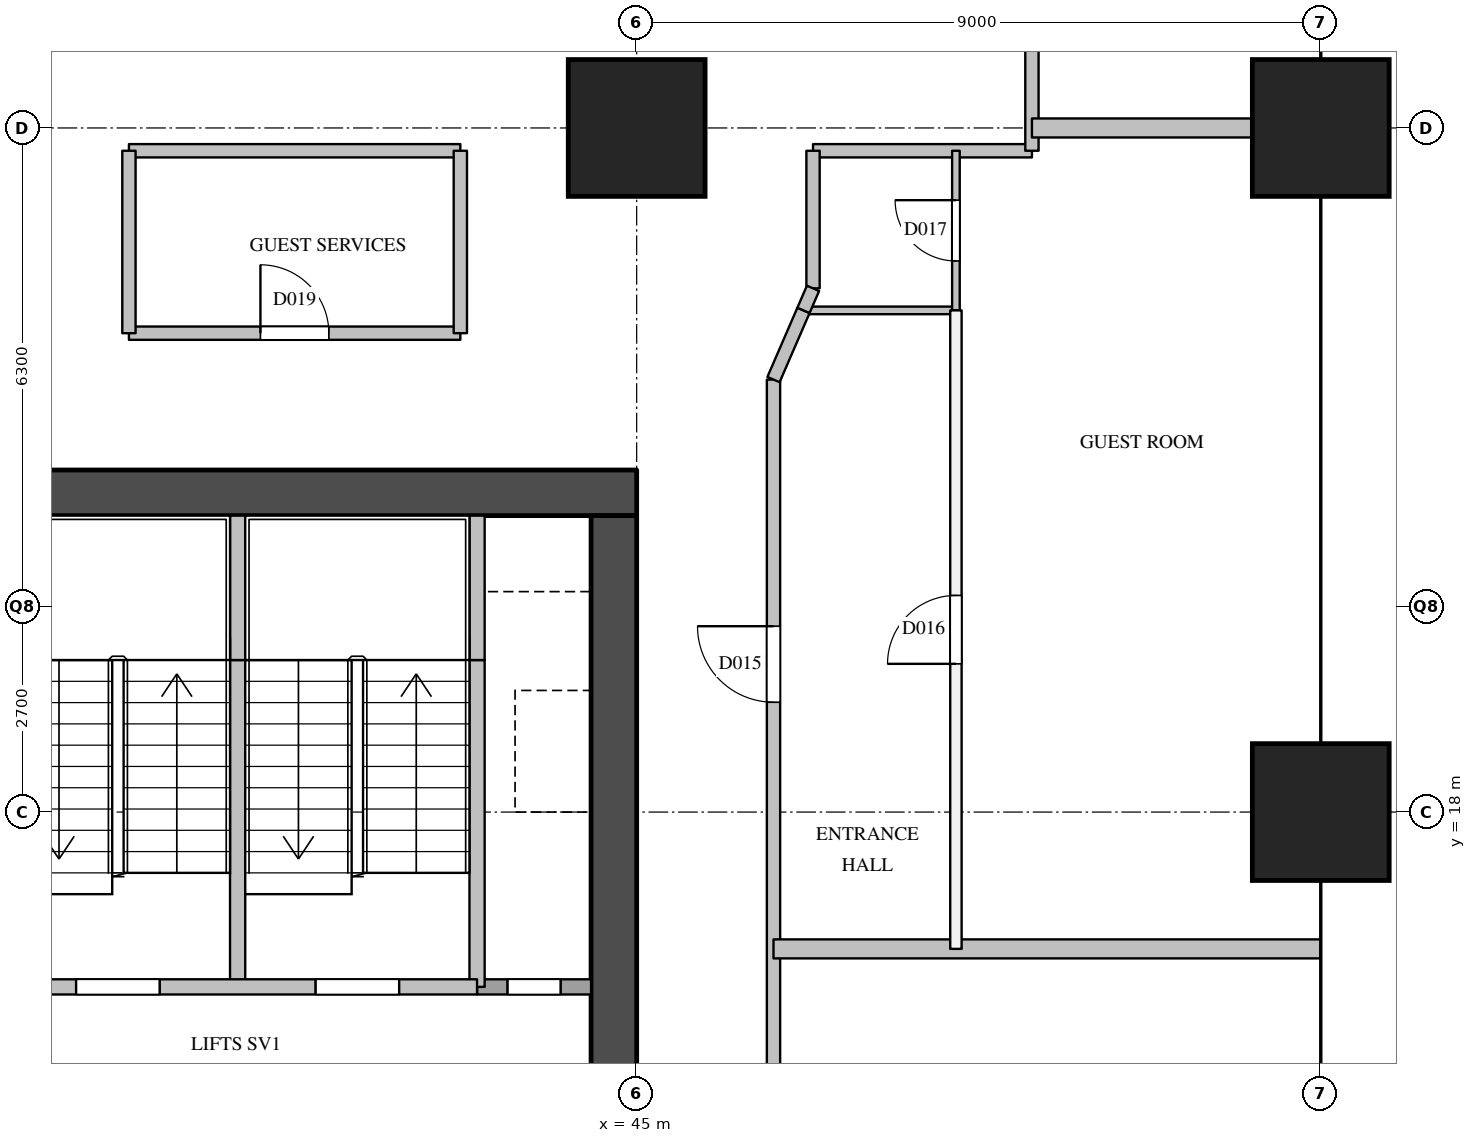
"""IFC4 building model, lengths in metres.
Left out: names, types, materials, properties, quantities, classifications, styles, units other than length and angle.
Written with IfcOpenShell. Run it as: python <this file> out.ifc"""

import sys

from ifc_helpers import new_model, si_unit, direction, frame, frame_2d, origin, origin_2d, place, context, subcontext, project, spatial, rectangle, extrude, element, fill, save


model = new_model("IFC4")
c1 = context("Model", 3, precision=1e-05, world=origin(), true_north=direction((0.0, 1.0)))
c2 = subcontext(c1, "Body", "Model", "MODEL_VIEW")
j1 = project(units=[si_unit("LENGTHUNIT", "METRE"), si_unit("PLANEANGLEUNIT", "RADIAN")], contexts=[c1])
p1 = place(None, origin())
s1 = spatial("IfcSite", under=j1, at=p1, CompositionType="ELEMENT")
p2 = place(p1, origin())
s2 = spatial("IfcBuilding", under=s1, at=p2, CompositionType="ELEMENT")
p3 = place(p2, frame((0.0, 0.0, 31.0)))
s3 = spatial("IfcBuildingStorey", under=s2, at=p3, CompositionType="ELEMENT", Elevation=31.0)
for number, where, z_axis, x_axis in (
    (1, (45.0, 27.0, 0.0), (0.0, 0.0, 1.0), (1.0, 0.0, 0.0)),
    (2, (54.0, 18.0, 0.0), (0.0, 0.0, 1.0), (1.0, 0.0, 0.0)),
    (3, (54.0, 27.0, 0.0), (0.0, 0.0, 1.0), (1.0, 0.0, 0.0)),
):
    element("IfcColumn", number, at=place(p3, frame(where, z_axis=z_axis, x_axis=x_axis)), inside=s3, PredefinedType="COLUMN", context=c2, shape_type="SweptSolid", body=[
        extrude(rectangle(XDim=1.8, YDim=1.8, at=origin_2d()), origin(), (0.0, 0.0, 1.0), 3.8),
    ])
p4 = place(p3, frame((36.0, 22.2, 0.0), z_axis=(0.0, 0.0, 1.0), x_axis=(1.0, 0.0, 0.0)))
e4 = element("IfcWall", 4, at=p4, inside=s3, PredefinedType="SHEAR", context=c2, shape_type="SweptSolid", body=[
    extrude(rectangle(XDim=9.0, YDim=0.6, at=frame_2d((4.5, 0.0))), origin(), (0.0, 0.0, 1.0), 3.5),
])
p5 = place(p3, frame((44.7, 9.6, 0.0), z_axis=(0.0, 0.0, 1.0), x_axis=(0.0, 1.0, 0.0)))
e5 = element("IfcWall", 5, at=p5, inside=s3, PredefinedType="SHEAR", context=c2, shape_type="SweptSolid", body=[
    extrude(rectangle(XDim=12.3, YDim=0.6, at=frame_2d((6.15, 0.0))), origin(), (0.0, 0.0, 1.0), 3.5),
])
p6 = place(p5, frame((0.8, 0.0, 0.0)))
e6 = element("IfcOpeningElement", 6, at=p6, cuts=e5, PredefinedType="OPENING", context=c2, shape_type="SweptSolid", body=[
    extrude(rectangle(XDim=0.7, YDim=2.1, at=frame_2d((0.35, 1.05))), frame((0.0, 0.31, 0.0), z_axis=(0.0, -1.0, 0.0), x_axis=(1.0, 0.0, 0.0)), (0.0, 0.0, 1.0), 0.62),
])
p7 = place(p3, frame((39.75, 15.7, 0.0), z_axis=(0.0, 0.0, 1.0), x_axis=(0.0, 1.0, 0.0)))
e7 = element("IfcWall", 7, at=p7, inside=s3, PredefinedType="SOLIDWALL", context=c2, shape_type="SweptSolid", body=[
    extrude(rectangle(XDim=4.3, YDim=0.2, at=frame_2d((2.15, 0.0))), origin(), (0.0, 0.0, 1.0), 3.5),
])
p8 = place(p3, frame((39.75, 20.0, 0.0), z_axis=(0.0, 0.0, 1.0), x_axis=(0.0, 1.0, 0.0)))
e8 = element("IfcWall", 8, at=p8, inside=s3, PredefinedType="SOLIDWALL", context=c2, shape_type="SweptSolid", body=[
    extrude(rectangle(XDim=1.9, YDim=0.2, at=frame_2d((0.95, 0.0))), origin(), (0.0, 0.0, 1.0), 3.5),
])
p9 = place(p3, frame((42.9, 15.7, 0.0), z_axis=(0.0, 0.0, 1.0), x_axis=(0.0, 1.0, 0.0)))
e9 = element("IfcWall", 9, at=p9, inside=s3, PredefinedType="SOLIDWALL", context=c2, shape_type="SweptSolid", body=[
    extrude(rectangle(XDim=4.3, YDim=0.2, at=frame_2d((2.15, 0.0))), origin(), (0.0, 0.0, 1.0), 3.5),
])
p10 = place(p3, frame((42.9, 20.0, 0.0), z_axis=(0.0, 0.0, 1.0), x_axis=(0.0, 1.0, 0.0)))
e10 = element("IfcWall", 10, at=p10, inside=s3, PredefinedType="SOLIDWALL", context=c2, shape_type="SweptSolid", body=[
    extrude(rectangle(XDim=1.9, YDim=0.2, at=frame_2d((0.95, 0.0))), origin(), (0.0, 0.0, 1.0), 3.5),
])
p11 = place(p3, frame((42.9, 15.7, 0.0), z_axis=(0.0, 0.0, 1.0), x_axis=(1.0, 0.0, 0.0)))
e11 = element("IfcWall", 11, at=p11, inside=s3, PredefinedType="SOLIDWALL", context=c2, shape_type="SweptSolid", body=[
    extrude(rectangle(XDim=1.5, YDim=0.2, at=frame_2d((0.75, 0.0))), origin(), (0.0, 0.0, 1.0), 3.5),
])
p12 = place(p11, frame((0.4, 0.0, 0.0)))
e12 = element("IfcOpeningElement", 12, at=p12, cuts=e11, PredefinedType="OPENING", context=c2, shape_type="SweptSolid", body=[
    extrude(rectangle(XDim=0.7, YDim=2.1, at=frame_2d((0.35, 1.05))), frame((0.0, 0.11, 0.0), z_axis=(0.0, -1.0, 0.0), x_axis=(1.0, 0.0, 0.0)), (0.0, 0.0, 1.0), 0.22),
])
p13 = place(p3, frame((36.6, 15.7, 0.0), z_axis=(0.0, 0.0, 1.0), x_axis=(1.0, 0.0, 0.0)))
e13 = element("IfcWall", 13, at=p13, inside=s3, PredefinedType="SOLIDWALL", context=c2, shape_type="SweptSolid", body=[
    extrude(rectangle(XDim=6.3, YDim=0.2, at=frame_2d((3.15, 0.0))), origin(), (0.0, 0.0, 1.0), 3.5),
])
p14 = place(p13, frame((1.025, 0.0, 0.0)))
e14 = element("IfcOpeningElement", 14, at=p14, cuts=e13, PredefinedType="OPENING", context=c2, shape_type="SweptSolid", body=[
    extrude(rectangle(XDim=1.1, YDim=2.1, at=frame_2d((0.55, 1.05))), frame((0.0, 0.11, 0.0), z_axis=(0.0, -1.0, 0.0), x_axis=(1.0, 0.0, 0.0)), (0.0, 0.0, 1.0), 0.22),
])
p15 = place(p13, frame((4.175, 0.0, 0.0)))
e15 = element("IfcOpeningElement", 15, at=p15, cuts=e13, PredefinedType="OPENING", context=c2, shape_type="SweptSolid", body=[
    extrude(rectangle(XDim=1.1, YDim=2.1, at=frame_2d((0.55, 1.05))), frame((0.0, 0.11, 0.0), z_axis=(0.0, -1.0, 0.0), x_axis=(1.0, 0.0, 0.0)), (0.0, 0.0, 1.0), 0.22),
])
p16 = place(p3, frame((38.32, 24.3, 0.0), z_axis=(0.0, 0.0, 1.0), x_axis=(1.0, 0.0, 0.0)))
e16 = element("IfcWall", 16, at=p16, inside=s3, PredefinedType="PARTITIONING", context=c2, shape_type="SweptSolid", body=[
    extrude(rectangle(XDim=4.36, YDim=0.175, at=frame_2d((2.18, 0.0))), origin(), (0.0, 0.0, 1.0), 3.5),
])
p17 = place(p16, frame((1.73, 0.0, 0.0)))
e17 = element("IfcOpeningElement", 17, at=p17, cuts=e16, PredefinedType="OPENING", context=c2, shape_type="SweptSolid", body=[
    extrude(rectangle(XDim=0.9, YDim=2.1, at=frame_2d((0.45, 1.05))), frame((0.0, 0.097, 0.0), z_axis=(0.0, -1.0, 0.0), x_axis=(1.0, 0.0, 0.0)), (0.0, 0.0, 1.0), 0.195),
])
p18 = place(p3, frame((38.32, 26.7, 0.0), z_axis=(0.0, 0.0, 1.0), x_axis=(1.0, 0.0, 0.0)))
e18 = element("IfcWall", 18, at=p18, inside=s3, PredefinedType="PARTITIONING", context=c2, shape_type="SweptSolid", body=[
    extrude(rectangle(XDim=4.36, YDim=0.175, at=frame_2d((2.18, 0.0))), origin(), (0.0, 0.0, 1.0), 2.5),
])
p19 = place(p3, frame((47.32, 26.7, 0.0), z_axis=(0.0, 0.0, 1.0), x_axis=(1.0, 0.0, 0.0)))
e19 = element("IfcWall", 19, at=p19, inside=s3, PredefinedType="PARTITIONING", context=c2, shape_type="SweptSolid", body=[
    extrude(rectangle(XDim=2.88, YDim=0.175, at=frame_2d((1.44, 0.0))), origin(), (0.0, 0.0, 1.0), 2.5),
])
for number, where, z_axis, x_axis in (
    (20, (38.32, 24.3, 0.0), (0.0, 0.0, 1.0), (0.0, 1.0, 0.0)),
    (21, (42.68, 24.3, 0.0), (0.0, 0.0, 1.0), (0.0, 1.0, 0.0)),
):
    element("IfcWall", number, at=place(p3, frame(where, z_axis=z_axis, x_axis=x_axis)), inside=s3, PredefinedType="PARTITIONING", context=c2, shape_type="SweptSolid", body=[
        extrude(rectangle(XDim=2.4, YDim=0.175, at=frame_2d((1.2, 0.0))), origin(), (0.0, 0.0, 1.0), 2.5),
    ])
p20 = place(p3, frame((46.8, 7.2, 0.0), z_axis=(0.0, 0.0, 1.0), x_axis=(0.0, 1.0, 0.0)))
e22 = element("IfcWall", 22, at=p20, inside=s3, PredefinedType="PARTITIONING", context=c2, shape_type="SweptSolid", body=[
    extrude(rectangle(XDim=16.49, YDim=0.175, at=frame_2d((8.245, 0.0))), origin(), (0.0, 0.0, 1.0), 3.5),
])
p21 = place(p20, frame((4.05, 0.0, 0.0)))
e23 = element("IfcOpeningElement", 23, at=p21, cuts=e22, PredefinedType="OPENING", context=c2, shape_type="SweptSolid", body=[
    extrude(rectangle(XDim=0.9, YDim=2.1, at=frame_2d((0.45, 1.05))), frame((0.0, 0.097, 0.0), z_axis=(0.0, -1.0, 0.0), x_axis=(1.0, 0.0, 0.0)), (0.0, 0.0, 1.0), 0.195),
])
p22 = place(p20, frame((12.245, 0.0, 0.0)))
e24 = element("IfcOpeningElement", 24, at=p22, cuts=e22, PredefinedType="OPENING", context=c2, shape_type="SweptSolid", body=[
    extrude(rectangle(XDim=1.0, YDim=2.1, at=frame_2d((0.5, 1.05))), frame((0.0, 0.097, 0.0), z_axis=(0.0, -1.0, 0.0), x_axis=(1.0, 0.0, 0.0)), (0.0, 0.0, 1.0), 0.195),
])
p23 = place(p3, frame((47.32, 24.89, 0.0), z_axis=(0.0, 0.0, 1.0), x_axis=(0.0, 1.0, 0.0)))
e25 = element("IfcWall", 25, at=p23, inside=s3, PredefinedType="PARTITIONING", context=c2, shape_type="SweptSolid", body=[
    extrude(rectangle(XDim=1.81, YDim=0.175, at=frame_2d((0.905, 0.0))), origin(), (0.0, 0.0, 1.0), 2.5),
])
p24 = place(p3, frame((50.2, 26.7, 0.0), z_axis=(0.0, 0.0, 1.0), x_axis=(0.0, 1.0, 0.0)))
e26 = element("IfcWall", 26, at=p24, inside=s3, PredefinedType="PARTITIONING", context=c2, shape_type="SweptSolid", body=[
    extrude(rectangle(XDim=25.1, YDim=0.175, at=frame_2d((12.55, 0.0))), origin(), (0.0, 0.0, 1.0), 2.5),
])
p25 = place(p24, frame((5.25, 0.0, 0.0)))
e27 = element("IfcOpeningElement", 27, at=p25, cuts=e26, PredefinedType="OPENING", context=c2, shape_type="SweptSolid", body=[
    extrude(rectangle(XDim=0.9, YDim=2.1, at=frame_2d((0.45, 1.05))), frame((0.0, 0.097, 0.0), z_axis=(0.0, -1.0, 0.0), x_axis=(1.0, 0.0, 0.0)), (0.0, 0.0, 1.0), 0.195),
])
p26 = place(p24, frame((13.35, 0.0, 0.0)))
e28 = element("IfcOpeningElement", 28, at=p26, cuts=e26, PredefinedType="OPENING", context=c2, shape_type="SweptSolid", body=[
    extrude(rectangle(XDim=0.9, YDim=2.1, at=frame_2d((0.45, 1.05))), frame((0.0, 0.097, 0.0), z_axis=(0.0, -1.0, 0.0), x_axis=(1.0, 0.0, 0.0)), (0.0, 0.0, 1.0), 0.195),
])
p27 = place(p24, frame((20.35, 0.0, 0.0)))
e29 = element("IfcOpeningElement", 29, at=p27, cuts=e26, PredefinedType="OPENING", context=c2, shape_type="SweptSolid", body=[
    extrude(rectangle(XDim=0.9, YDim=2.1, at=frame_2d((0.45, 1.05))), frame((0.0, 0.097, 0.0), z_axis=(0.0, -1.0, 0.0), x_axis=(1.0, 0.0, 0.0)), (0.0, 0.0, 1.0), 0.195),
])
p28 = place(p3, frame((49.2, 16.2, 0.0), z_axis=(0.0, 0.0, 1.0), x_axis=(0.0, 1.0, 0.0)))
e30 = element("IfcWall", 30, at=p28, inside=s3, PredefinedType="PARTITIONING", context=c2, shape_type="SweptSolid", body=[
    extrude(rectangle(XDim=8.4, YDim=0.15, at=frame_2d((4.2, 0.0))), origin(), (0.0, 0.0, 1.0), 3.5),
])
p29 = place(p28, frame((3.75, 0.0, 0.0)))
e31 = element("IfcOpeningElement", 31, at=p29, cuts=e30, PredefinedType="OPENING", context=c2, shape_type="SweptSolid", body=[
    extrude(rectangle(XDim=0.9, YDim=2.1, at=frame_2d((0.45, 1.05))), frame((0.0, 0.085, 0.0), z_axis=(0.0, -1.0, 0.0), x_axis=(1.0, 0.0, 0.0)), (0.0, 0.0, 1.0), 0.17),
])
p30 = place(p3, frame((46.8, 16.2, 0.0), z_axis=(0.0, 0.0, 1.0), x_axis=(1.0, 0.0, 0.0)))
e32 = element("IfcWall", 32, at=p30, inside=s3, PredefinedType="PARTITIONING", context=c2, shape_type="SweptSolid", body=[
    extrude(rectangle(XDim=7.2, YDim=0.25, at=frame_2d((3.6, 0.0))), origin(), (0.0, 0.0, 1.0), 2.5),
])
p31 = place(p3, frame((50.2, 27.0, 0.0), z_axis=(0.0, 0.0, 1.0), x_axis=(1.0, 0.0, 0.0)))
e33 = element("IfcWall", 33, at=p31, inside=s3, PredefinedType="PARTITIONING", context=c2, shape_type="SweptSolid", body=[
    extrude(rectangle(XDim=3.8, YDim=0.25, at=frame_2d((1.9, 0.0))), origin(), (0.0, 0.0, 1.0), 2.5),
])
p32 = place(p3, frame((47.194, 24.6, 0.0), z_axis=(0.0, 0.0, 1.0), x_axis=(1.0, 0.0, 0.0)))
e34 = element("IfcWall", 34, at=p32, inside=s3, PredefinedType="PARTITIONING", context=c2, shape_type="SweptSolid", body=[
    extrude(rectangle(XDim=2.006, YDim=0.1, at=frame_2d((1.003, 0.0))), origin(), (0.0, 0.0, 1.0), 3.5),
])
p33 = place(p3, frame((49.2, 24.6, 0.0), z_axis=(0.0, 0.0, 1.0), x_axis=(0.0, 1.0, 0.0)))
e35 = element("IfcWall", 35, at=p33, inside=s3, PredefinedType="PARTITIONING", context=c2, shape_type="SweptSolid", body=[
    extrude(rectangle(XDim=2.1, YDim=0.1, at=frame_2d((1.05, 0.0))), origin(), (0.0, 0.0, 1.0), 2.5),
])
p34 = place(p33, frame((0.65, 0.0, 0.0)))
e36 = element("IfcOpeningElement", 36, at=p34, cuts=e35, PredefinedType="OPENING", context=c2, shape_type="SweptSolid", body=[
    extrude(rectangle(XDim=0.8, YDim=2.1, at=frame_2d((0.4, 1.05))), frame((0.0, 0.06, 0.0), z_axis=(0.0, -1.0, 0.0), x_axis=(1.0, 0.0, 0.0)), (0.0, 0.0, 1.0), 0.12),
])
p35 = place(p3, frame((47.194, 24.6, 0.0), z_axis=(0.0, 0.0, 1.0), x_axis=(-0.397510730652, -0.917597525616, 0.0)))
e37 = element("IfcWall", 37, at=p35, inside=s3, PredefinedType="PARTITIONING", context=c2, shape_type="SweptSolid", body=[
    extrude(rectangle(XDim=0.992, YDim=0.175, at=frame_2d((0.496, 0.0))), origin(), (0.0, 0.0, 1.0), 3.5),
])
p36 = place(p3, frame((47.32, 24.89, 0.0), z_axis=(0.0, 0.0, 1.0), x_axis=(-0.398019489606, -0.917376959539, 0.0)))
e38 = element("IfcWall", 38, at=p36, inside=s3, PredefinedType="PARTITIONING", context=c2, shape_type="SweptSolid", body=[
    extrude(rectangle(XDim=0.316, YDim=0.175, at=frame_2d((0.158, 0.0))), origin(), (0.0, 0.0, 1.0), 3.5),
])
p37 = place(p14, origin())
e39 = element("IfcDoor", 39, at=p37, inside=s3, OperationType="SINGLE_SWING_LEFT", PredefinedType="DOOR", context=c2, shape_type="SweptSolid", body=[
    extrude(rectangle(XDim=1.1, YDim=2.1, at=frame_2d((0.55, 1.05))), frame((0.0, 0.025, 0.0), z_axis=(0.0, -1.0, 0.0), x_axis=(1.0, 0.0, 0.0)), (0.0, 0.0, 1.0), 0.05),
])
fill(e14, e39)
p38 = place(p15, origin())
e40 = element("IfcDoor", 40, at=p38, inside=s3, OperationType="SINGLE_SWING_RIGHT", PredefinedType="DOOR", context=c2, shape_type="SweptSolid", body=[
    extrude(rectangle(XDim=1.1, YDim=2.1, at=frame_2d((0.55, 1.05))), frame((0.0, 0.025, 0.0), z_axis=(0.0, -1.0, 0.0), x_axis=(1.0, 0.0, 0.0)), (0.0, 0.0, 1.0), 0.05),
])
fill(e15, e40)
p39 = place(p12, origin())
e41 = element("IfcDoor", 41, at=p39, inside=s3, OperationType="SINGLE_SWING_LEFT", PredefinedType="DOOR", context=c2, shape_type="SweptSolid", body=[
    extrude(rectangle(XDim=0.7, YDim=2.1, at=frame_2d((0.35, 1.05))), frame((0.0, 0.025, 0.0), z_axis=(0.0, -1.0, 0.0), x_axis=(1.0, 0.0, 0.0)), (0.0, 0.0, 1.0), 0.05),
])
fill(e12, e41)
p40 = place(p22, origin())
e42 = element("IfcDoor", 42, at=p40, inside=s3, OperationType="SINGLE_SWING_RIGHT", PredefinedType="DOOR", context=c2, shape_type="SweptSolid", body=[
    extrude(rectangle(XDim=1.0, YDim=2.1, at=frame_2d((0.5, 1.05))), frame((0.0, 0.025, 0.0), z_axis=(0.0, -1.0, 0.0), x_axis=(1.0, 0.0, 0.0)), (0.0, 0.0, 1.0), 0.05),
])
fill(e24, e42)
p41 = place(p29, origin())
e43 = element("IfcDoor", 43, at=p41, inside=s3, OperationType="SINGLE_SWING_LEFT", PredefinedType="DOOR", context=c2, shape_type="SweptSolid", body=[
    extrude(rectangle(XDim=0.9, YDim=2.1, at=frame_2d((0.45, 1.05))), frame((0.0, 0.025, 0.0), z_axis=(0.0, -1.0, 0.0), x_axis=(1.0, 0.0, 0.0)), (0.0, 0.0, 1.0), 0.05),
])
fill(e31, e43)
p42 = place(p34, origin())
e44 = element("IfcDoor", 44, at=p42, inside=s3, OperationType="SINGLE_SWING_RIGHT", PredefinedType="DOOR", context=c2, shape_type="SweptSolid", body=[
    extrude(rectangle(XDim=0.8, YDim=2.1, at=frame_2d((0.4, 1.05))), frame((0.0, 0.025, 0.0), z_axis=(0.0, -1.0, 0.0), x_axis=(1.0, 0.0, 0.0)), (0.0, 0.0, 1.0), 0.05),
])
fill(e36, e44)
p43 = place(p17, origin())
e45 = element("IfcDoor", 45, at=p43, inside=s3, OperationType="SINGLE_SWING_LEFT", PredefinedType="DOOR", context=c2, shape_type="SweptSolid", body=[
    extrude(rectangle(XDim=0.9, YDim=2.1, at=frame_2d((0.45, 1.05))), frame((0.0, 0.025, 0.0), z_axis=(0.0, -1.0, 0.0), x_axis=(1.0, 0.0, 0.0)), (0.0, 0.0, 1.0), 0.05),
])
fill(e17, e45)
save(model, sys.argv[1])
